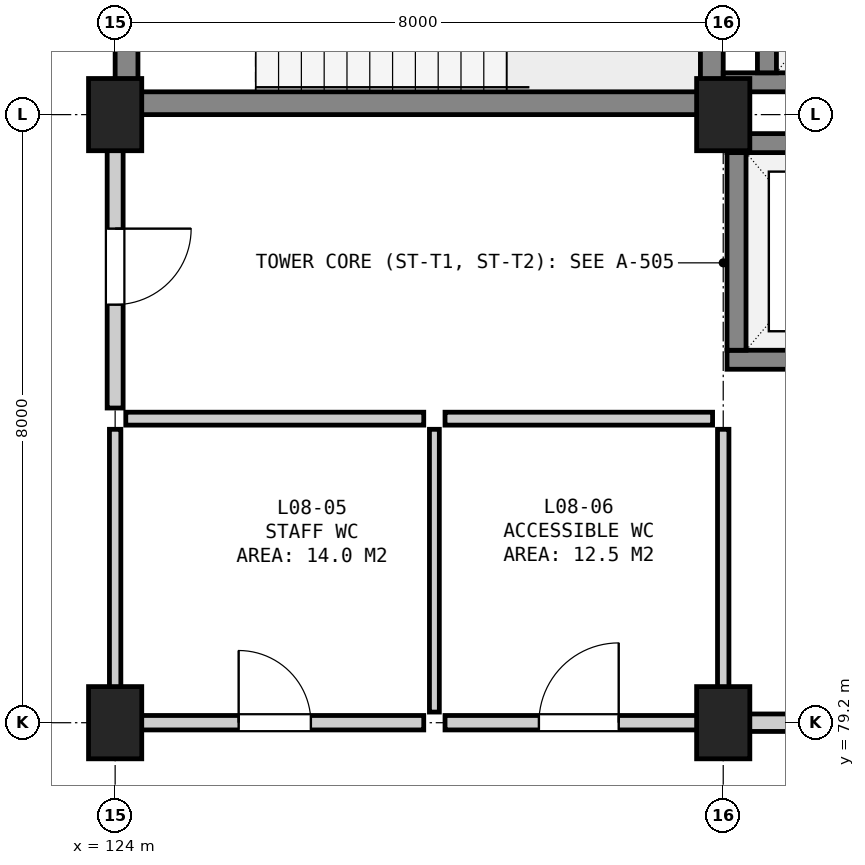
"""IFC4 building model, lengths in metres.
Left out: names, types, materials, properties, quantities, classifications, styles, units other than length and angle.
Written with IfcOpenShell. Run it as: python <this file> out.ifc"""

import sys

from ifc_helpers import new_model, si_unit, direction, frame, frame_2d, origin, origin_2d, place, context, subcontext, project, spatial, rectangle, extrude, element, fill, save


model = new_model("IFC4")
c1 = context("Model", 3, precision=1e-05, world=origin(), true_north=direction((0.0, 1.0)))
c2 = subcontext(c1, "Body", "Model", "MODEL_VIEW")
j1 = project(units=[si_unit("LENGTHUNIT", "METRE"), si_unit("PLANEANGLEUNIT", "RADIAN")], contexts=[c1])
p1 = place(None, origin())
s1 = spatial("IfcSite", under=j1, at=p1, CompositionType="ELEMENT")
p2 = place(p1, origin())
s2 = spatial("IfcBuilding", under=s1, at=p2, CompositionType="ELEMENT")
p3 = place(p2, frame((0.0, 0.0, 35.6)))
s3 = spatial("IfcBuildingStorey", under=s2, at=p3, CompositionType="ELEMENT", Elevation=35.6)
for number, where, z_axis, x_axis in (
    (1, (124.0, 79.2, 0.0), (0.0, 0.0, 1.0), (1.0, 0.0, 0.0)),
    (2, (124.0, 87.2, 0.0), (0.0, 0.0, 1.0), (1.0, 0.0, 0.0)),
    (3, (132.0, 79.2, 0.0), (0.0, 0.0, 1.0), (1.0, 0.0, 0.0)),
    (4, (132.0, 87.2, 0.0), (0.0, 0.0, 1.0), (1.0, 0.0, 0.0)),
):
    element("IfcColumn", number, at=place(p3, frame(where, z_axis=z_axis, x_axis=x_axis)), inside=s3, PredefinedType="COLUMN", context=c2, shape_type="SweptSolid", body=[
        extrude(rectangle(XDim=0.7, YDim=0.95, at=origin_2d()), origin(), (0.0, 0.0, 1.0), 3.9),
    ])
for number, where, z_axis, x_axis in (
    (5, (124.15, 87.2, 0.0), (0.0, 0.0, 1.0), (0.0, 1.0, 0.0)),
    (6, (131.85, 87.2, 0.0), (0.0, 0.0, 1.0), (0.0, 1.0, 0.0)),
):
    element("IfcWall", number, at=place(p3, frame(where, z_axis=z_axis, x_axis=x_axis)), inside=s3, PredefinedType="SHEAR", context=c2, shape_type="SweptSolid", body=[
        extrude(rectangle(XDim=4.2, YDim=0.3, at=frame_2d((2.1, 0.0))), origin(), (0.0, 0.0, 1.0), 3.62),
    ])
p4 = place(p3, frame((124.3, 87.35, 0.0), z_axis=(0.0, 0.0, 1.0), x_axis=(1.0, 0.0, 0.0)))
e7 = element("IfcWall", 7, at=p4, inside=s3, PredefinedType="SHEAR", context=c2, shape_type="SweptSolid", body=[
    extrude(rectangle(XDim=7.4, YDim=0.3, at=frame_2d((3.7, 0.0))), origin(), (0.0, 0.0, 1.0), 3.62),
])
p5 = place(p3, frame((132.0, 87.625, 0.0), z_axis=(0.0, 0.0, 1.0), x_axis=(1.0, 0.0, 0.0)))
e8 = element("IfcWall", 8, at=p5, inside=s3, PredefinedType="SHEAR", context=c2, shape_type="SweptSolid", body=[
    extrude(rectangle(XDim=3.15, YDim=0.25, at=frame_2d((1.575, 0.0))), origin(), (0.0, 0.0, 1.0), 3.62),
])
p6 = place(p3, frame((132.575, 87.75, 0.0), z_axis=(0.0, 0.0, 1.0), x_axis=(0.0, 1.0, 0.0)))
e9 = element("IfcWall", 9, at=p6, inside=s3, PredefinedType="SHEAR", context=c2, shape_type="SweptSolid", body=[
    extrude(rectangle(XDim=2.9, YDim=0.25, at=frame_2d((1.45, 0.0))), origin(), (0.0, 0.0, 1.0), 3.62),
])
p7 = place(p3, frame((132.05, 83.975, 0.0), z_axis=(0.0, 0.0, 1.0), x_axis=(1.0, 0.0, 0.0)))
e10 = element("IfcWall", 10, at=p7, inside=s3, PredefinedType="SHEAR", context=c2, shape_type="SweptSolid", body=[
    extrude(rectangle(XDim=2.7, YDim=0.25, at=frame_2d((1.35, 0.0))), origin(), (0.0, 0.0, 1.0), 3.62),
])
p8 = place(p7, frame((0.8, 0.0, 0.0)))
e11 = element("IfcOpeningElement", 11, at=p8, cuts=e10, PredefinedType="OPENING", context=c2, shape_type="SweptSolid", body=[
    extrude(rectangle(XDim=1.1, YDim=2.15, at=frame_2d((0.55, 1.075))), frame((0.0, 0.137, 0.0), z_axis=(0.0, -1.0, 0.0), x_axis=(1.0, 0.0, 0.0)), (0.0, 0.0, 1.0), 0.274),
])
p9 = place(p3, frame((132.05, 86.825, 0.0), z_axis=(0.0, 0.0, 1.0), x_axis=(1.0, 0.0, 0.0)))
e12 = element("IfcWall", 12, at=p9, inside=s3, PredefinedType="SHEAR", context=c2, shape_type="SweptSolid", body=[
    extrude(rectangle(XDim=2.7, YDim=0.25, at=frame_2d((1.35, 0.0))), origin(), (0.0, 0.0, 1.0), 3.62),
])
p10 = place(p3, frame((132.175, 84.1, 0.0), z_axis=(0.0, 0.0, 1.0), x_axis=(0.0, 1.0, 0.0)))
e13 = element("IfcWall", 13, at=p10, inside=s3, PredefinedType="SHEAR", context=c2, shape_type="SweptSolid", body=[
    extrude(rectangle(XDim=2.6, YDim=0.25, at=frame_2d((1.3, 0.0))), origin(), (0.0, 0.0, 1.0), 3.62),
])
p11 = place(p3, frame((124.14, 79.2, 0.0), z_axis=(0.0, 0.0, 1.0), x_axis=(1.0, 0.0, 0.0)))
e14 = element("IfcWall", 14, at=p11, inside=s3, PredefinedType="PARTITIONING", context=c2, shape_type="SweptSolid", body=[
    extrude(rectangle(XDim=3.92, YDim=0.19, at=frame_2d((1.96, 0.0))), origin(), (0.0, 0.0, 1.0), 3.095),
])
p12 = place(p11, frame((1.485, 0.0, 0.0)))
e15 = element("IfcOpeningElement", 15, at=p12, cuts=e14, PredefinedType="OPENING", context=c2, shape_type="SweptSolid", body=[
    extrude(rectangle(XDim=0.95, YDim=2.15, at=frame_2d((0.475, 1.075))), frame((0.0, 0.107, 0.0), z_axis=(0.0, -1.0, 0.0), x_axis=(1.0, 0.0, 0.0)), (0.0, 0.0, 1.0), 0.214),
])
p13 = place(p3, frame((124.14, 83.2, 0.0), z_axis=(0.0, 0.0, 1.0), x_axis=(1.0, 0.0, 0.0)))
e16 = element("IfcWall", 16, at=p13, inside=s3, PredefinedType="PARTITIONING", context=c2, shape_type="SweptSolid", body=[
    extrude(rectangle(XDim=3.92, YDim=0.17, at=frame_2d((1.96, 0.0))), origin(), (0.0, 0.0, 1.0), 3.62),
])
p14 = place(p3, frame((124.0, 79.34, 0.0), z_axis=(0.0, 0.0, 1.0), x_axis=(0.0, 1.0, 0.0)))
e17 = element("IfcWall", 17, at=p14, inside=s3, PredefinedType="PARTITIONING", context=c2, shape_type="SweptSolid", body=[
    extrude(rectangle(XDim=3.72, YDim=0.15, at=frame_2d((1.86, 0.0))), origin(), (0.0, 0.0, 1.0), 3.145),
])
p15 = place(p3, frame((128.2, 79.34, 0.0), z_axis=(0.0, 0.0, 1.0), x_axis=(0.0, 1.0, 0.0)))
e18 = element("IfcWall", 18, at=p15, inside=s3, PredefinedType="PARTITIONING", context=c2, shape_type="SweptSolid", body=[
    extrude(rectangle(XDim=3.72, YDim=0.13, at=frame_2d((1.86, 0.0))), origin(), (0.0, 0.0, 1.0), 3.62),
])
p16 = place(p3, frame((128.34, 79.2, 0.0), z_axis=(0.0, 0.0, 1.0), x_axis=(1.0, 0.0, 0.0)))
e19 = element("IfcWall", 19, at=p16, inside=s3, PredefinedType="PARTITIONING", context=c2, shape_type="SweptSolid", body=[
    extrude(rectangle(XDim=3.52, YDim=0.19, at=frame_2d((1.76, 0.0))), origin(), (0.0, 0.0, 1.0), 3.095),
])
p17 = place(p16, frame((1.235, 0.0, 0.0)))
e20 = element("IfcOpeningElement", 20, at=p17, cuts=e19, PredefinedType="OPENING", context=c2, shape_type="SweptSolid", body=[
    extrude(rectangle(XDim=1.05, YDim=2.15, at=frame_2d((0.525, 1.075))), frame((0.0, 0.107, 0.0), z_axis=(0.0, -1.0, 0.0), x_axis=(1.0, 0.0, 0.0)), (0.0, 0.0, 1.0), 0.214),
])
p18 = place(p3, frame((128.34, 83.2, 0.0), z_axis=(0.0, 0.0, 1.0), x_axis=(1.0, 0.0, 0.0)))
e21 = element("IfcWall", 21, at=p18, inside=s3, PredefinedType="PARTITIONING", context=c2, shape_type="SweptSolid", body=[
    extrude(rectangle(XDim=3.52, YDim=0.17, at=frame_2d((1.76, 0.0))), origin(), (0.0, 0.0, 1.0), 3.62),
])
p19 = place(p3, frame((132.0, 79.34, 0.0), z_axis=(0.0, 0.0, 1.0), x_axis=(0.0, 1.0, 0.0)))
e22 = element("IfcWall", 22, at=p19, inside=s3, PredefinedType="PARTITIONING", context=c2, shape_type="SweptSolid", body=[
    extrude(rectangle(XDim=3.72, YDim=0.15, at=frame_2d((1.86, 0.0))), origin(), (0.0, 0.0, 1.0), 2.995),
])
p20 = place(p3, frame((124.0, 83.34, 0.0), z_axis=(0.0, 0.0, 1.0), x_axis=(0.0, 1.0, 0.0)))
e23 = element("IfcWall", 23, at=p20, inside=s3, PredefinedType="SOLIDWALL", context=c2, shape_type="SweptSolid", body=[
    extrude(rectangle(XDim=3.72, YDim=0.21, at=frame_2d((1.86, 0.0))), origin(), (0.0, 0.0, 1.0), 3.145),
])
p21 = place(p20, frame((1.36, 0.0, 0.0)))
e24 = element("IfcOpeningElement", 24, at=p21, cuts=e23, PredefinedType="OPENING", context=c2, shape_type="SweptSolid", body=[
    extrude(rectangle(XDim=1.0, YDim=2.15, at=frame_2d((0.5, 1.075))), frame((0.0, 0.117, 0.0), z_axis=(0.0, -1.0, 0.0), x_axis=(1.0, 0.0, 0.0)), (0.0, 0.0, 1.0), 0.234),
])
p22 = place(p3, frame((132.14, 79.2, 0.0), z_axis=(0.0, 0.0, 1.0), x_axis=(1.0, 0.0, 0.0)))
e25 = element("IfcWall", 25, at=p22, inside=s3, PredefinedType="SOLIDWALL", context=c2, shape_type="SweptSolid", body=[
    extrude(rectangle(XDim=7.72, YDim=0.23, at=frame_2d((3.86, 0.0))), origin(), (0.0, 0.0, 1.0), 3.095),
])
p23 = place(p22, frame((3.11, 0.0, 0.0)))
e26 = element("IfcOpeningElement", 26, at=p23, cuts=e25, PredefinedType="OPENING", context=c2, shape_type="SweptSolid", body=[
    extrude(rectangle(XDim=1.5, YDim=2.2, at=frame_2d((0.75, 1.1))), frame((0.0, 0.127, 0.0), z_axis=(0.0, -1.0, 0.0), x_axis=(1.0, 0.0, 0.0)), (0.0, 0.0, 1.0), 0.254),
])
p24 = place(p12, origin())
e27 = element("IfcDoor", 27, at=p24, inside=s3, OperationType="SINGLE_SWING_LEFT", PredefinedType="DOOR", context=c2, shape_type="SweptSolid", body=[
    extrude(rectangle(XDim=0.95, YDim=2.15, at=frame_2d((0.475, 1.075))), frame((0.0, 0.025, 0.0), z_axis=(0.0, -1.0, 0.0), x_axis=(1.0, 0.0, 0.0)), (0.0, 0.0, 1.0), 0.05),
])
fill(e15, e27)
p25 = place(p17, origin())
e28 = element("IfcDoor", 28, at=p25, inside=s3, OperationType="SINGLE_SWING_RIGHT", PredefinedType="DOOR", context=c2, shape_type="SweptSolid", body=[
    extrude(rectangle(XDim=1.05, YDim=2.15, at=frame_2d((0.525, 1.075))), frame((0.0, 0.025, 0.0), z_axis=(0.0, -1.0, 0.0), x_axis=(1.0, 0.0, 0.0)), (0.0, 0.0, 1.0), 0.05),
])
fill(e20, e28)
p26 = place(p21, frame((1.0, 0.0, 0.0), z_axis=(0.0, 0.0, 1.0), x_axis=(-1.0, 0.0, 0.0)))
e29 = element("IfcDoor", 29, at=p26, inside=s3, OperationType="SINGLE_SWING_LEFT", PredefinedType="DOOR", context=c2, shape_type="SweptSolid", body=[
    extrude(rectangle(XDim=1.0, YDim=2.15, at=frame_2d((0.5, 1.075))), frame((0.0, 0.025, 0.0), z_axis=(0.0, -1.0, 0.0), x_axis=(1.0, 0.0, 0.0)), (0.0, 0.0, 1.0), 0.05),
])
fill(e24, e29)
save(model, sys.argv[1])
